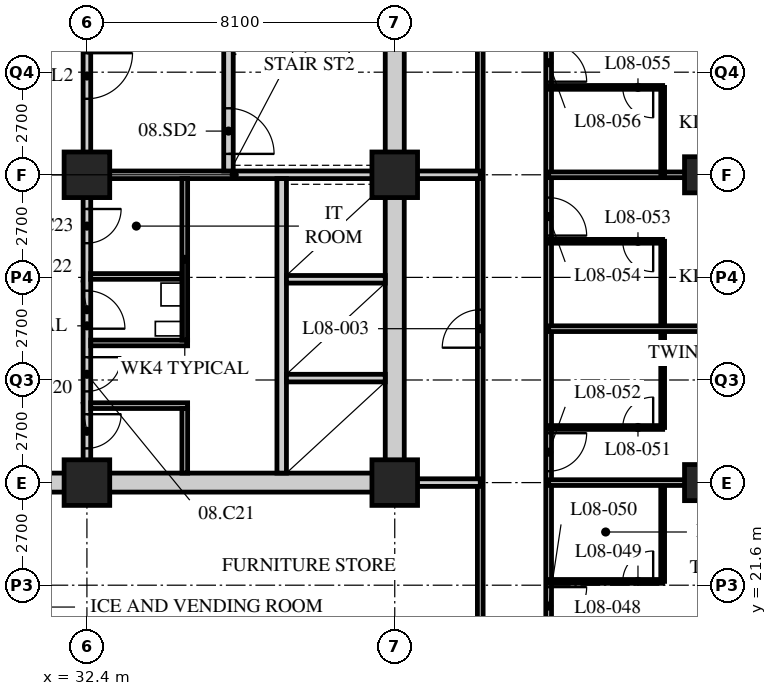
"""IFC4 building model, lengths in metres.
Left out: names, types, materials, properties, quantities, classifications, styles, units other than length and angle.
Written with IfcOpenShell. Run it as: python <this file> out.ifc"""

import sys

from ifc_helpers import new_model, si_unit, direction, frame, frame_2d, origin, origin_2d, place, context, subcontext, project, spatial, rectangle, hollow_rectangle, extrude, element, fill, save


model = new_model("IFC4")
c1 = context("Model", 3, precision=1e-05, world=origin(), true_north=direction((0.0, 1.0)))
c2 = subcontext(c1, "Body", "Model", "MODEL_VIEW")
j1 = project(units=[si_unit("LENGTHUNIT", "METRE"), si_unit("PLANEANGLEUNIT", "RADIAN")], contexts=[c1])
p1 = place(None, origin())
s1 = spatial("IfcSite", under=j1, at=p1, CompositionType="ELEMENT")
p2 = place(p1, origin())
s2 = spatial("IfcBuilding", under=s1, at=p2, CompositionType="ELEMENT")
p3 = place(p2, frame((0.0, 0.0, 39.8)))
s3 = spatial("IfcBuildingStorey", under=s2, at=p3, CompositionType="ELEMENT", Elevation=39.8)
for number, where, z_axis, x_axis in (
    (1, (32.4, 24.3, 0.0), (0.0, 0.0, 1.0), (1.0, 0.0, 0.0)),
    (2, (32.4, 32.4, 0.0), (0.0, 0.0, 1.0), (1.0, 0.0, 0.0)),
    (3, (40.5, 24.3, 0.0), (0.0, 0.0, 1.0), (1.0, 0.0, 0.0)),
    (4, (40.5, 32.4, 0.0), (0.0, 0.0, 1.0), (1.0, 0.0, 0.0)),
):
    element("IfcColumn", number, at=place(p3, frame(where, z_axis=z_axis, x_axis=x_axis)), inside=s3, PredefinedType="COLUMN", context=c2, shape_type="SweptSolid", body=[
        extrude(hollow_rectangle(XDim=1.2, YDim=1.2, WallThickness=0.12, at=origin_2d()), origin(), (0.0, 0.0, 1.0), 3.4),
    ])
for number, where, z_axis, x_axis in (
    (5, (48.6, 24.3, 0.0), (0.0, 0.0, 1.0), (1.0, 0.0, 0.0)),
    (6, (48.6, 32.4, 0.0), (0.0, 0.0, 1.0), (1.0, 0.0, 0.0)),
):
    element("IfcColumn", number, at=place(p3, frame(where, z_axis=z_axis, x_axis=x_axis)), inside=s3, PredefinedType="COLUMN", context=c2, shape_type="SweptSolid", body=[
        extrude(hollow_rectangle(XDim=0.95, YDim=0.95, WallThickness=0.095, at=origin_2d()), origin(), (0.0, 0.0, 1.0), 3.4),
    ])
p4 = place(p3, frame((44.55, 16.2, 0.0), z_axis=(0.0, 0.0, 1.0), x_axis=(0.0, 1.0, 0.0)))
e7 = element("IfcWall", 7, at=p4, inside=s3, PredefinedType="PARTITIONING", context=c2, shape_type="SweptSolid", body=[
    extrude(rectangle(XDim=26.1, YDim=0.15, at=frame_2d((13.05, 0.0))), origin(), (0.0, 0.0, 1.0), 3.19),
])
p5 = place(p4, frame((2.75, 0.0, 0.0)))
e8 = element("IfcOpeningElement", 8, at=p5, cuts=e7, PredefinedType="OPENING", context=c2, shape_type="SweptSolid", body=[
    extrude(rectangle(XDim=1.0, YDim=2.1, at=frame_2d((0.5, 1.05))), frame((0.0, 0.085, 0.0), z_axis=(0.0, -1.0, 0.0), x_axis=(1.0, 0.0, 0.0)), (0.0, 0.0, 1.0), 0.17),
])
p6 = place(p4, frame((4.35, 0.0, 0.0)))
e9 = element("IfcOpeningElement", 9, at=p6, cuts=e7, PredefinedType="OPENING", context=c2, shape_type="SweptSolid", body=[
    extrude(rectangle(XDim=1.0, YDim=2.1, at=frame_2d((0.5, 1.05))), frame((0.0, 0.085, 0.0), z_axis=(0.0, -1.0, 0.0), x_axis=(1.0, 0.0, 0.0)), (0.0, 0.0, 1.0), 0.17),
])
p7 = place(p4, frame((8.4, 0.0, 0.0)))
e10 = element("IfcOpeningElement", 10, at=p7, cuts=e7, PredefinedType="OPENING", context=c2, shape_type="SweptSolid", body=[
    extrude(rectangle(XDim=1.0, YDim=2.1, at=frame_2d((0.5, 1.05))), frame((0.0, 0.085, 0.0), z_axis=(0.0, -1.0, 0.0), x_axis=(1.0, 0.0, 0.0)), (0.0, 0.0, 1.0), 0.17),
])
p8 = place(p4, frame((14.6, 0.0, 0.0)))
e11 = element("IfcOpeningElement", 11, at=p8, cuts=e7, PredefinedType="OPENING", context=c2, shape_type="SweptSolid", body=[
    extrude(rectangle(XDim=1.0, YDim=2.1, at=frame_2d((0.5, 1.05))), frame((0.0, 0.085, 0.0), z_axis=(0.0, -1.0, 0.0), x_axis=(1.0, 0.0, 0.0)), (0.0, 0.0, 1.0), 0.17),
])
p9 = place(p4, frame((18.65, 0.0, 0.0)))
e12 = element("IfcOpeningElement", 12, at=p9, cuts=e7, PredefinedType="OPENING", context=c2, shape_type="SweptSolid", body=[
    extrude(rectangle(XDim=1.0, YDim=2.1, at=frame_2d((0.5, 1.05))), frame((0.0, 0.085, 0.0), z_axis=(0.0, -1.0, 0.0), x_axis=(1.0, 0.0, 0.0)), (0.0, 0.0, 1.0), 0.17),
])
p10 = place(p4, frame((22.65, 0.0, 0.0)))
e13 = element("IfcOpeningElement", 13, at=p10, cuts=e7, PredefinedType="OPENING", context=c2, shape_type="SweptSolid", body=[
    extrude(rectangle(XDim=1.0, YDim=2.1, at=frame_2d((0.5, 1.05))), frame((0.0, 0.085, 0.0), z_axis=(0.0, -1.0, 0.0), x_axis=(1.0, 0.0, 0.0)), (0.0, 0.0, 1.0), 0.17),
])
p11 = place(p3, frame((42.75, 18.0, 0.0), z_axis=(0.0, 0.0, 1.0), x_axis=(0.0, 1.0, 0.0)))
e14 = element("IfcWall", 14, at=p11, inside=s3, PredefinedType="PARTITIONING", context=c2, shape_type="SweptSolid", body=[
    extrude(rectangle(XDim=22.5, YDim=0.15, at=frame_2d((11.25, 0.0))), origin(), (0.0, 0.0, 1.0), 3.19),
])
p12 = place(p11, frame((9.85, 0.0, 0.0)))
e15 = element("IfcOpeningElement", 15, at=p12, cuts=e14, PredefinedType="OPENING", context=c2, shape_type="SweptSolid", body=[
    extrude(rectangle(XDim=1.0, YDim=2.1, at=frame_2d((0.5, 1.05))), frame((0.0, 0.085, 0.0), z_axis=(0.0, -1.0, 0.0), x_axis=(1.0, 0.0, 0.0)), (0.0, 0.0, 1.0), 0.17),
])
p13 = place(p11, frame((17.95, 0.0, 0.0)))
e16 = element("IfcOpeningElement", 16, at=p13, cuts=e14, PredefinedType="OPENING", context=c2, shape_type="SweptSolid", body=[
    extrude(rectangle(XDim=1.0, YDim=2.1, at=frame_2d((0.5, 1.05))), frame((0.0, 0.085, 0.0), z_axis=(0.0, -1.0, 0.0), x_axis=(1.0, 0.0, 0.0)), (0.0, 0.0, 1.0), 0.17),
])
for number, where, z_axis, x_axis in (
    (17, (40.5, 32.4, 0.0), (0.0, 0.0, 1.0), (1.0, 0.0, 0.0)),
    (18, (40.5, 24.3, 0.0), (0.0, 0.0, 1.0), (1.0, 0.0, 0.0)),
):
    element("IfcWall", number, at=place(p3, frame(where, z_axis=z_axis, x_axis=x_axis)), inside=s3, PredefinedType="SOLIDWALL", context=c2, shape_type="SweptSolid", body=[
        extrude(rectangle(XDim=2.25, YDim=0.2, at=frame_2d((1.125, 0.0))), origin(), (0.0, 0.0, 1.0), 2.578),
    ])
p14 = place(p3, frame((47.55, 21.7, 0.0), z_axis=(0.0, 0.0, 1.0), x_axis=(0.0, 1.0, 0.0)))
e19 = element("IfcWall", 19, at=p14, inside=s3, PredefinedType="PARTITIONING", context=c2, shape_type="SweptSolid", body=[
    extrude(rectangle(XDim=2.6, YDim=0.1, at=frame_2d((1.3, 0.0))), origin(), (0.0, 0.0, 1.0), 3.19),
])
p15 = place(p3, frame((44.55, 21.7, 0.0), z_axis=(0.0, 0.0, 1.0), x_axis=(1.0, 0.0, 0.0)))
e20 = element("IfcWall", 20, at=p15, inside=s3, PredefinedType="PARTITIONING", context=c2, shape_type="SweptSolid", body=[
    extrude(rectangle(XDim=3.0, YDim=0.1, at=frame_2d((1.5, 0.0))), origin(), (0.0, 0.0, 1.0), 3.19),
])
p16 = place(p15, frame((1.95, 0.0, 0.0)))
e21 = element("IfcOpeningElement", 21, at=p16, cuts=e20, PredefinedType="OPENING", context=c2, shape_type="SweptSolid", body=[
    extrude(rectangle(XDim=0.8, YDim=2.1, at=frame_2d((0.4, 1.05))), frame((0.0, 0.06, 0.0), z_axis=(0.0, -1.0, 0.0), x_axis=(1.0, 0.0, 0.0)), (0.0, 0.0, 1.0), 0.12),
])
p17 = place(p3, frame((44.55, 24.3, 0.0), z_axis=(0.0, 0.0, 1.0), x_axis=(1.0, 0.0, 0.0)))
e22 = element("IfcWall", 22, at=p17, inside=s3, PredefinedType="PARTITIONING", context=c2, shape_type="SweptSolid", body=[
    extrude(rectangle(XDim=11.85, YDim=0.15, at=frame_2d((5.925, 0.0))), origin(), (0.0, 0.0, 1.0), 2.578),
])
p18 = place(p3, frame((47.55, 25.75, 0.0), z_axis=(0.0, 0.0, 1.0), x_axis=(0.0, 1.0, 0.0)))
e23 = element("IfcWall", 23, at=p18, inside=s3, PredefinedType="PARTITIONING", context=c2, shape_type="SweptSolid", body=[
    extrude(rectangle(XDim=4.9, YDim=0.1, at=frame_2d((2.45, 0.0))), origin(), (0.0, 0.0, 1.0), 3.19),
])
p19 = place(p3, frame((44.55, 25.75, 0.0), z_axis=(0.0, 0.0, 1.0), x_axis=(1.0, 0.0, 0.0)))
e24 = element("IfcWall", 24, at=p19, inside=s3, PredefinedType="PARTITIONING", context=c2, shape_type="SweptSolid", body=[
    extrude(rectangle(XDim=3.0, YDim=0.1, at=frame_2d((1.5, 0.0))), origin(), (0.0, 0.0, 1.0), 3.19),
])
p20 = place(p19, frame((1.95, 0.0, 0.0)))
e25 = element("IfcOpeningElement", 25, at=p20, cuts=e24, PredefinedType="OPENING", context=c2, shape_type="SweptSolid", body=[
    extrude(rectangle(XDim=0.8, YDim=2.1, at=frame_2d((0.4, 1.05))), frame((0.0, 0.06, 0.0), z_axis=(0.0, -1.0, 0.0), x_axis=(1.0, 0.0, 0.0)), (0.0, 0.0, 1.0), 0.12),
])
p21 = place(p3, frame((44.55, 28.35, 0.0), z_axis=(0.0, 0.0, 1.0), x_axis=(1.0, 0.0, 0.0)))
e26 = element("IfcWall", 26, at=p21, inside=s3, PredefinedType="PARTITIONING", context=c2, shape_type="SweptSolid", body=[
    extrude(rectangle(XDim=11.85, YDim=0.15, at=frame_2d((5.925, 0.0))), origin(), (0.0, 0.0, 1.0), 3.19),
])
p22 = place(p3, frame((44.55, 30.65, 0.0), z_axis=(0.0, 0.0, 1.0), x_axis=(1.0, 0.0, 0.0)))
e27 = element("IfcWall", 27, at=p22, inside=s3, PredefinedType="PARTITIONING", context=c2, shape_type="SweptSolid", body=[
    extrude(rectangle(XDim=3.0, YDim=0.1, at=frame_2d((1.5, 0.0))), origin(), (0.0, 0.0, 1.0), 3.19),
])
p23 = place(p22, frame((1.95, 0.0, 0.0)))
e28 = element("IfcOpeningElement", 28, at=p23, cuts=e27, PredefinedType="OPENING", context=c2, shape_type="SweptSolid", body=[
    extrude(rectangle(XDim=0.8, YDim=2.1, at=frame_2d((0.4, 1.05))), frame((0.0, 0.06, 0.0), z_axis=(0.0, -1.0, 0.0), x_axis=(1.0, 0.0, 0.0)), (0.0, 0.0, 1.0), 0.12),
])
p24 = place(p3, frame((44.55, 32.4, 0.0), z_axis=(0.0, 0.0, 1.0), x_axis=(1.0, 0.0, 0.0)))
e29 = element("IfcWall", 29, at=p24, inside=s3, PredefinedType="PARTITIONING", context=c2, shape_type="SweptSolid", body=[
    extrude(rectangle(XDim=11.85, YDim=0.15, at=frame_2d((5.925, 0.0))), origin(), (0.0, 0.0, 1.0), 2.578),
])
p25 = place(p3, frame((47.55, 32.4, 0.0), z_axis=(0.0, 0.0, 1.0), x_axis=(0.0, 1.0, 0.0)))
e30 = element("IfcWall", 30, at=p25, inside=s3, PredefinedType="PARTITIONING", context=c2, shape_type="SweptSolid", body=[
    extrude(rectangle(XDim=2.3, YDim=0.1, at=frame_2d((1.15, 0.0))), origin(), (0.0, 0.0, 1.0), 3.19),
])
p26 = place(p3, frame((44.55, 34.7, 0.0), z_axis=(0.0, 0.0, 1.0), x_axis=(1.0, 0.0, 0.0)))
e31 = element("IfcWall", 31, at=p26, inside=s3, PredefinedType="PARTITIONING", context=c2, shape_type="SweptSolid", body=[
    extrude(rectangle(XDim=3.0, YDim=0.1, at=frame_2d((1.5, 0.0))), origin(), (0.0, 0.0, 1.0), 3.19),
])
p27 = place(p26, frame((1.95, 0.0, 0.0)))
e32 = element("IfcOpeningElement", 32, at=p27, cuts=e31, PredefinedType="OPENING", context=c2, shape_type="SweptSolid", body=[
    extrude(rectangle(XDim=0.8, YDim=2.1, at=frame_2d((0.4, 1.05))), frame((0.0, 0.06, 0.0), z_axis=(0.0, -1.0, 0.0), x_axis=(1.0, 0.0, 0.0)), (0.0, 0.0, 1.0), 0.12),
])
p28 = place(p3, frame((15.95, 24.3, 0.0), z_axis=(0.0, 0.0, 1.0), x_axis=(1.0, 0.0, 0.0)))
e33 = element("IfcWall", 33, at=p28, inside=s3, PredefinedType="SOLIDWALL", context=c2, shape_type="SweptSolid", body=[
    extrude(rectangle(XDim=24.8, YDim=0.5, at=frame_2d((12.4, 0.0))), origin(), (0.0, 0.0, 1.0), 2.54),
])
p29 = place(p28, frame((11.5, 0.0, 0.0)))
e34 = element("IfcOpeningElement", 34, at=p29, cuts=e33, PredefinedType="OPENING", context=c2, shape_type="SweptSolid", body=[
    extrude(rectangle(XDim=1.8, YDim=2.4, at=frame_2d((0.9, 1.2))), frame((0.0, 0.26, 0.0), z_axis=(0.0, -1.0, 0.0), x_axis=(1.0, 0.0, 0.0)), (0.0, 0.0, 1.0), 0.52),
])
p30 = place(p3, frame((40.5, 24.55, 0.0), z_axis=(0.0, 0.0, 1.0), x_axis=(0.0, 1.0, 0.0)))
e35 = element("IfcWall", 35, at=p30, inside=s3, PredefinedType="SOLIDWALL", context=c2, shape_type="SweptSolid", body=[
    extrude(rectangle(XDim=15.7, YDim=0.5, at=frame_2d((7.85, 0.0))), origin(), (0.0, 0.0, 1.0), 2.578),
])
p31 = place(p3, frame((32.3, 32.4, 0.0), z_axis=(0.0, 0.0, 1.0), x_axis=(1.0, 0.0, 0.0)))
e36 = element("IfcWall", 36, at=p31, inside=s3, PredefinedType="SOLIDWALL", context=c2, shape_type="SweptSolid", body=[
    extrude(rectangle(XDim=7.95, YDim=0.2, at=frame_2d((3.975, 0.0))), origin(), (0.0, 0.0, 1.0), 2.578),
])
p32 = place(p3, frame((32.4, 32.5, 0.0), z_axis=(0.0, 0.0, 1.0), x_axis=(0.0, 1.0, 0.0)))
e37 = element("IfcWall", 37, at=p32, inside=s3, PredefinedType="SOLIDWALL", context=c2, shape_type="SweptSolid", body=[
    extrude(rectangle(XDim=7.75, YDim=0.2, at=frame_2d((3.875, 0.0))), origin(), (0.0, 0.0, 1.0), 2.578),
])
p33 = place(p32, frame((1.9, 0.0, 0.0)))
e38 = element("IfcOpeningElement", 38, at=p33, cuts=e37, PredefinedType="OPENING", context=c2, shape_type="SweptSolid", body=[
    extrude(rectangle(XDim=1.2, YDim=2.1, at=frame_2d((0.6, 1.05))), frame((0.0, 0.11, 0.0), z_axis=(0.0, -1.0, 0.0), x_axis=(1.0, 0.0, 0.0)), (0.0, 0.0, 1.0), 0.22),
])
p34 = place(p3, frame((37.525, 24.55, 0.0), z_axis=(0.0, 0.0, 1.0), x_axis=(0.0, 1.0, 0.0)))
e39 = element("IfcWall", 39, at=p34, inside=s3, PredefinedType="SOLIDWALL", context=c2, shape_type="SweptSolid", body=[
    extrude(rectangle(XDim=7.75, YDim=0.25, at=frame_2d((3.875, 0.0))), origin(), (0.0, 0.0, 1.0), 3.19),
])
for number, where, z_axis, x_axis in (
    (40, (37.65, 27.05, 0.0), (0.0, 0.0, 1.0), (1.0, 0.0, 0.0)),
    (41, (37.65, 29.65, 0.0), (0.0, 0.0, 1.0), (1.0, 0.0, 0.0)),
):
    element("IfcWall", number, at=place(p3, frame(where, z_axis=z_axis, x_axis=x_axis)), inside=s3, PredefinedType="SOLIDWALL", context=c2, shape_type="SweptSolid", body=[
        extrude(rectangle(XDim=2.6, YDim=0.2, at=frame_2d((1.3, 0.0))), origin(), (0.0, 0.0, 1.0), 3.19),
    ])
p35 = place(p3, frame((36.125, 32.5, 0.0), z_axis=(0.0, 0.0, 1.0), x_axis=(0.0, 1.0, 0.0)))
e42 = element("IfcWall", 42, at=p35, inside=s3, PredefinedType="SOLIDWALL", context=c2, shape_type="SweptSolid", body=[
    extrude(rectangle(XDim=7.75, YDim=0.25, at=frame_2d((3.875, 0.0))), origin(), (0.0, 0.0, 1.0), 3.19),
])
p36 = place(p35, frame((0.45, 0.0, 0.0)))
e43 = element("IfcOpeningElement", 43, at=p36, cuts=e42, PredefinedType="OPENING", context=c2, shape_type="SweptSolid", body=[
    extrude(rectangle(XDim=1.2, YDim=2.1, at=frame_2d((0.6, 1.05))), frame((0.0, 0.135, 0.0), z_axis=(0.0, -1.0, 0.0), x_axis=(1.0, 0.0, 0.0)), (0.0, 0.0, 1.0), 0.27),
])
p37 = place(p3, frame((32.4, 24.55, 0.0), z_axis=(0.0, 0.0, 1.0), x_axis=(0.0, 1.0, 0.0)))
e44 = element("IfcWall", 44, at=p37, inside=s3, PredefinedType="PARTITIONING", context=c2, shape_type="SweptSolid", body=[
    extrude(rectangle(XDim=7.75, YDim=0.2, at=frame_2d((3.875, 0.0))), origin(), (0.0, 0.0, 1.0), 2.578),
])
p38 = place(p37, frame((0.65, 0.0, 0.0)))
e45 = element("IfcOpeningElement", 45, at=p38, cuts=e44, PredefinedType="OPENING", context=c2, shape_type="SweptSolid", body=[
    extrude(rectangle(XDim=0.9, YDim=2.1, at=frame_2d((0.45, 1.05))), frame((0.0, 0.11, 0.0), z_axis=(0.0, -1.0, 0.0), x_axis=(1.0, 0.0, 0.0)), (0.0, 0.0, 1.0), 0.22),
])
p39 = place(p37, frame((2.15, 0.0, 0.0)))
e46 = element("IfcOpeningElement", 46, at=p39, cuts=e44, PredefinedType="OPENING", context=c2, shape_type="SweptSolid", body=[
    extrude(rectangle(XDim=0.9, YDim=2.1, at=frame_2d((0.45, 1.05))), frame((0.0, 0.11, 0.0), z_axis=(0.0, -1.0, 0.0), x_axis=(1.0, 0.0, 0.0)), (0.0, 0.0, 1.0), 0.22),
])
p40 = place(p37, frame((3.8, 0.0, 0.0)))
e47 = element("IfcOpeningElement", 47, at=p40, cuts=e44, PredefinedType="OPENING", context=c2, shape_type="SweptSolid", body=[
    extrude(rectangle(XDim=1.0, YDim=2.1, at=frame_2d((0.5, 1.05))), frame((0.0, 0.11, 0.0), z_axis=(0.0, -1.0, 0.0), x_axis=(1.0, 0.0, 0.0)), (0.0, 0.0, 1.0), 0.22),
])
p41 = place(p37, frame((6.05, 0.0, 0.0)))
e48 = element("IfcOpeningElement", 48, at=p41, cuts=e44, PredefinedType="OPENING", context=c2, shape_type="SweptSolid", body=[
    extrude(rectangle(XDim=0.9, YDim=2.1, at=frame_2d((0.45, 1.05))), frame((0.0, 0.11, 0.0), z_axis=(0.0, -1.0, 0.0), x_axis=(1.0, 0.0, 0.0)), (0.0, 0.0, 1.0), 0.22),
])
for number, where, z_axis, x_axis in (
    (49, (32.5, 26.325, 0.0), (0.0, 0.0, 1.0), (1.0, 0.0, 0.0)),
    (50, (32.5, 27.975, 0.0), (0.0, 0.0, 1.0), (1.0, 0.0, 0.0)),
):
    element("IfcWall", number, at=place(p3, frame(where, z_axis=z_axis, x_axis=x_axis)), inside=s3, PredefinedType="PARTITIONING", context=c2, shape_type="SweptSolid", body=[
        extrude(rectangle(XDim=2.55, YDim=0.15, at=frame_2d((1.275, 0.0))), origin(), (0.0, 0.0, 1.0), 3.19),
    ])
p42 = place(p3, frame((32.5, 29.725, 0.0), z_axis=(0.0, 0.0, 1.0), x_axis=(1.0, 0.0, 0.0)))
e51 = element("IfcWall", 51, at=p42, inside=s3, PredefinedType="PARTITIONING", context=c2, shape_type="SweptSolid", body=[
    extrude(rectangle(XDim=2.4, YDim=0.15, at=frame_2d((1.2, 0.0))), origin(), (0.0, 0.0, 1.0), 3.19),
])
p43 = place(p3, frame((34.975, 24.55, 0.0), z_axis=(0.0, 0.0, 1.0), x_axis=(0.0, 1.0, 0.0)))
e52 = element("IfcWall", 52, at=p43, inside=s3, PredefinedType="PARTITIONING", context=c2, shape_type="SweptSolid", body=[
    extrude(rectangle(XDim=1.7, YDim=0.15, at=frame_2d((0.85, 0.0))), origin(), (0.0, 0.0, 1.0), 3.19),
])
p44 = place(p3, frame((34.975, 28.05, 0.0), z_axis=(0.0, 0.0, 1.0), x_axis=(0.0, 1.0, 0.0)))
e53 = element("IfcWall", 53, at=p44, inside=s3, PredefinedType="PARTITIONING", context=c2, shape_type="SweptSolid", body=[
    extrude(rectangle(XDim=4.25, YDim=0.15, at=frame_2d((2.125, 0.0))), origin(), (0.0, 0.0, 1.0), 3.19),
])
p45 = place(p12, origin())
e54 = element("IfcDoor", 54, at=p45, inside=s3, OperationType="SINGLE_SWING_LEFT", PredefinedType="DOOR", context=c2, shape_type="SweptSolid", body=[
    extrude(rectangle(XDim=1.0, YDim=2.1, at=frame_2d((0.5, 1.05))), frame((0.0, 0.025, 0.0), z_axis=(0.0, -1.0, 0.0), x_axis=(1.0, 0.0, 0.0)), (0.0, 0.0, 1.0), 0.05),
])
fill(e15, e54)
p46 = place(p16, origin())
e55 = element("IfcDoor", 55, at=p46, inside=s3, OperationType="SINGLE_SWING_RIGHT", PredefinedType="DOOR", context=c2, shape_type="SweptSolid", body=[
    extrude(rectangle(XDim=0.8, YDim=2.1, at=frame_2d((0.4, 1.05))), frame((0.0, 0.025, 0.0), z_axis=(0.0, -1.0, 0.0), x_axis=(1.0, 0.0, 0.0)), (0.0, 0.0, 1.0), 0.05),
])
fill(e21, e55)
p47 = place(p6, origin())
e56 = element("IfcDoor", 56, at=p47, inside=s3, OperationType="SINGLE_SWING_LEFT", PredefinedType="DOOR", context=c2, shape_type="SweptSolid", body=[
    extrude(rectangle(XDim=1.0, YDim=2.1, at=frame_2d((0.5, 1.05))), frame((0.0, 0.025, 0.0), z_axis=(0.0, -1.0, 0.0), x_axis=(1.0, 0.0, 0.0)), (0.0, 0.0, 1.0), 0.05),
])
fill(e9, e56)
p48 = place(p20, origin())
e57 = element("IfcDoor", 57, at=p48, inside=s3, OperationType="SINGLE_SWING_RIGHT", PredefinedType="DOOR", context=c2, shape_type="SweptSolid", body=[
    extrude(rectangle(XDim=0.8, YDim=2.1, at=frame_2d((0.4, 1.05))), frame((0.0, 0.025, 0.0), z_axis=(0.0, -1.0, 0.0), x_axis=(1.0, 0.0, 0.0)), (0.0, 0.0, 1.0), 0.05),
])
fill(e25, e57)
p49 = place(p7, origin())
e58 = element("IfcDoor", 58, at=p49, inside=s3, OperationType="SINGLE_SWING_LEFT", PredefinedType="DOOR", context=c2, shape_type="SweptSolid", body=[
    extrude(rectangle(XDim=1.0, YDim=2.1, at=frame_2d((0.5, 1.05))), frame((0.0, 0.025, 0.0), z_axis=(0.0, -1.0, 0.0), x_axis=(1.0, 0.0, 0.0)), (0.0, 0.0, 1.0), 0.05),
])
fill(e10, e58)
p50 = place(p23, origin())
e59 = element("IfcDoor", 59, at=p50, inside=s3, OperationType="SINGLE_SWING_LEFT", PredefinedType="DOOR", context=c2, shape_type="SweptSolid", body=[
    extrude(rectangle(XDim=0.8, YDim=2.1, at=frame_2d((0.4, 1.05))), frame((0.0, 0.025, 0.0), z_axis=(0.0, -1.0, 0.0), x_axis=(1.0, 0.0, 0.0)), (0.0, 0.0, 1.0), 0.05),
])
fill(e28, e59)
p51 = place(p8, origin())
e60 = element("IfcDoor", 60, at=p51, inside=s3, OperationType="SINGLE_SWING_RIGHT", PredefinedType="DOOR", context=c2, shape_type="SweptSolid", body=[
    extrude(rectangle(XDim=1.0, YDim=2.1, at=frame_2d((0.5, 1.05))), frame((0.0, 0.025, 0.0), z_axis=(0.0, -1.0, 0.0), x_axis=(1.0, 0.0, 0.0)), (0.0, 0.0, 1.0), 0.05),
])
fill(e11, e60)
p52 = place(p27, origin())
e61 = element("IfcDoor", 61, at=p52, inside=s3, OperationType="SINGLE_SWING_LEFT", PredefinedType="DOOR", context=c2, shape_type="SweptSolid", body=[
    extrude(rectangle(XDim=0.8, YDim=2.1, at=frame_2d((0.4, 1.05))), frame((0.0, 0.025, 0.0), z_axis=(0.0, -1.0, 0.0), x_axis=(1.0, 0.0, 0.0)), (0.0, 0.0, 1.0), 0.05),
])
fill(e32, e61)
p53 = place(p9, origin())
e62 = element("IfcDoor", 62, at=p53, inside=s3, OperationType="SINGLE_SWING_RIGHT", PredefinedType="DOOR", context=c2, shape_type="SweptSolid", body=[
    extrude(rectangle(XDim=1.0, YDim=2.1, at=frame_2d((0.5, 1.05))), frame((0.0, 0.025, 0.0), z_axis=(0.0, -1.0, 0.0), x_axis=(1.0, 0.0, 0.0)), (0.0, 0.0, 1.0), 0.05),
])
fill(e12, e62)
p54 = place(p38, origin())
e63 = element("IfcDoor", 63, at=p54, inside=s3, OperationType="SINGLE_SWING_LEFT", PredefinedType="DOOR", context=c2, shape_type="SweptSolid", body=[
    extrude(rectangle(XDim=0.9, YDim=2.1, at=frame_2d((0.45, 1.05))), frame((0.0, 0.025, 0.0), z_axis=(0.0, -1.0, 0.0), x_axis=(1.0, 0.0, 0.0)), (0.0, 0.0, 1.0), 0.05),
])
fill(e45, e63)
p55 = place(p39, origin())
e64 = element("IfcDoor", 64, at=p55, inside=s3, OperationType="SINGLE_SWING_LEFT", PredefinedType="DOOR", context=c2, shape_type="SweptSolid", body=[
    extrude(rectangle(XDim=0.9, YDim=2.1, at=frame_2d((0.45, 1.05))), frame((0.0, 0.025, 0.0), z_axis=(0.0, -1.0, 0.0), x_axis=(1.0, 0.0, 0.0)), (0.0, 0.0, 1.0), 0.05),
])
fill(e46, e64)
p56 = place(p40, origin())
e65 = element("IfcDoor", 65, at=p56, inside=s3, OperationType="SINGLE_SWING_RIGHT", PredefinedType="DOOR", context=c2, shape_type="SweptSolid", body=[
    extrude(rectangle(XDim=1.0, YDim=2.1, at=frame_2d((0.5, 1.05))), frame((0.0, 0.025, 0.0), z_axis=(0.0, -1.0, 0.0), x_axis=(1.0, 0.0, 0.0)), (0.0, 0.0, 1.0), 0.05),
])
fill(e47, e65)
p57 = place(p41, origin())
e66 = element("IfcDoor", 66, at=p57, inside=s3, OperationType="SINGLE_SWING_LEFT", PredefinedType="DOOR", context=c2, shape_type="SweptSolid", body=[
    extrude(rectangle(XDim=0.9, YDim=2.1, at=frame_2d((0.45, 1.05))), frame((0.0, 0.025, 0.0), z_axis=(0.0, -1.0, 0.0), x_axis=(1.0, 0.0, 0.0)), (0.0, 0.0, 1.0), 0.05),
])
fill(e48, e66)
p58 = place(p36, origin())
e67 = element("IfcDoor", 67, at=p58, inside=s3, OperationType="SINGLE_SWING_RIGHT", PredefinedType="DOOR", context=c2, shape_type="SweptSolid", body=[
    extrude(rectangle(XDim=1.2, YDim=2.1, at=frame_2d((0.6, 1.05))), frame((0.0, 0.025, 0.0), z_axis=(0.0, -1.0, 0.0), x_axis=(1.0, 0.0, 0.0)), (0.0, 0.0, 1.0), 0.05),
])
fill(e43, e67)
p59 = place(p33, origin())
e68 = element("IfcDoor", 68, at=p59, inside=s3, OperationType="SINGLE_SWING_LEFT", PredefinedType="DOOR", context=c2, shape_type="SweptSolid", body=[
    extrude(rectangle(XDim=1.2, YDim=2.1, at=frame_2d((0.6, 1.05))), frame((0.0, 0.025, 0.0), z_axis=(0.0, -1.0, 0.0), x_axis=(1.0, 0.0, 0.0)), (0.0, 0.0, 1.0), 0.05),
])
fill(e38, e68)
save(model, sys.argv[1])
